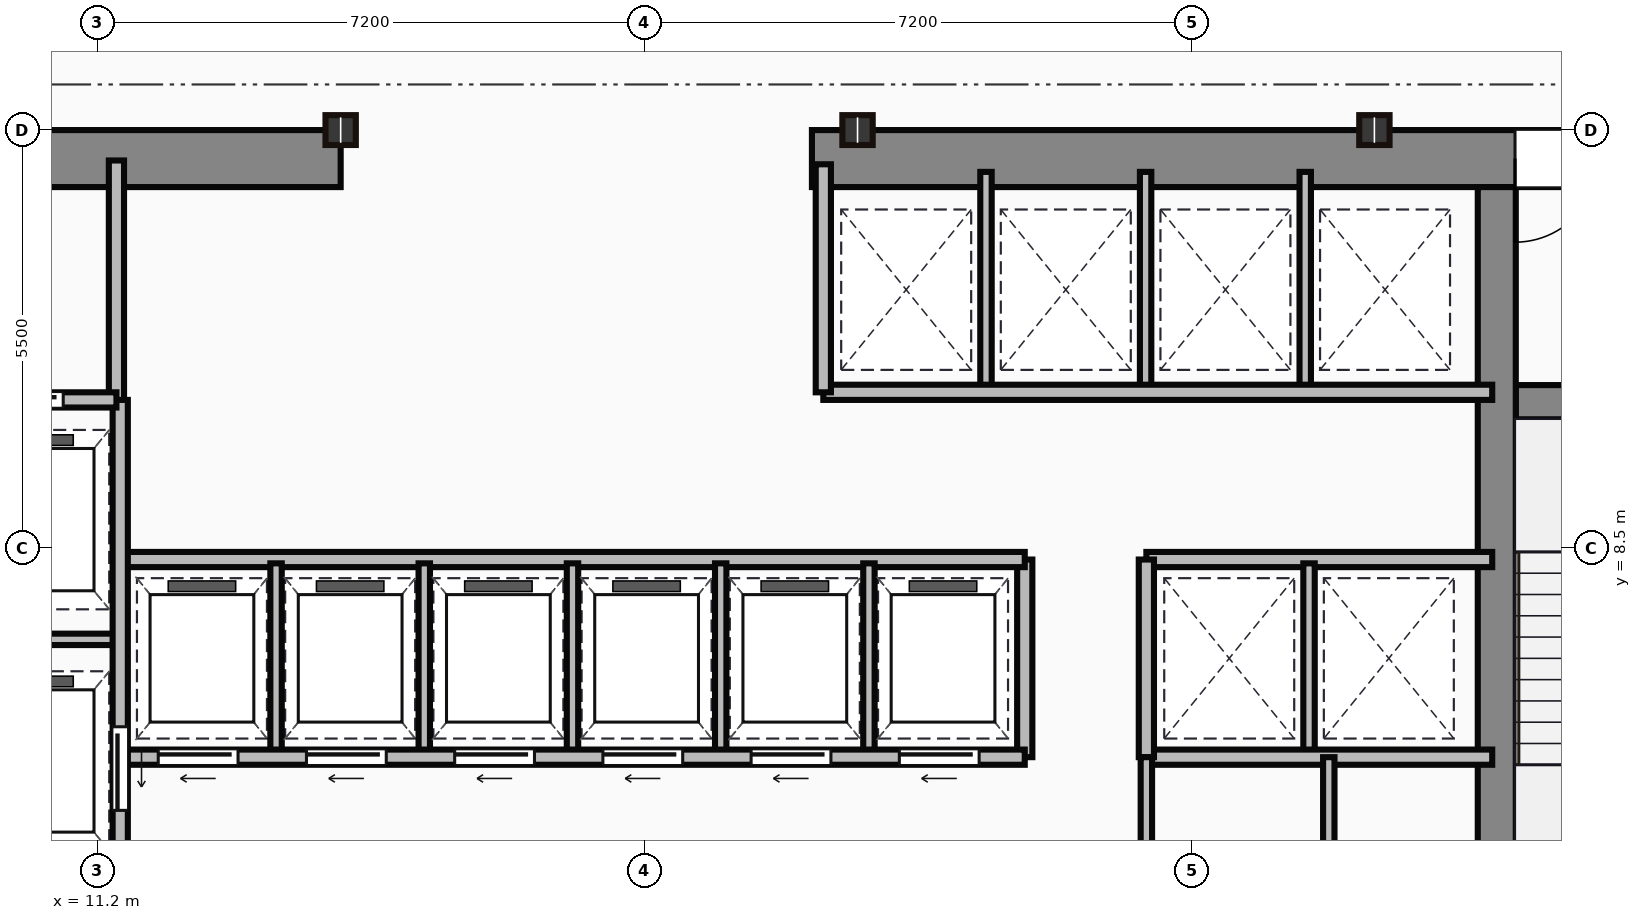
"""IFC4 building model, lengths in metres.
Left out: names, types, materials, properties, quantities, classifications, styles, units other than length and angle.
Written with IfcOpenShell. Run it as: python <this file> out.ifc"""

import sys

from ifc_helpers import new_model, si_unit, direction, frame, frame_2d, origin, origin_2d, place, context, subcontext, project, spatial, rectangle, i_section, extrude, source, transform, mapped, element, fill, save


model = new_model("IFC4")
c1 = context("Model", 3, precision=1e-05, world=origin(), true_north=direction((0.0, 1.0)))
c2 = subcontext(c1, "Body", "Model", "MODEL_VIEW")
j1 = project(units=[si_unit("LENGTHUNIT", "METRE"), si_unit("PLANEANGLEUNIT", "RADIAN")], contexts=[c1])
p1 = place(None, origin())
s1 = spatial("IfcSite", under=j1, at=p1, CompositionType="ELEMENT")
p2 = place(p1, origin())
s2 = spatial("IfcBuilding", under=s1, at=p2, CompositionType="ELEMENT")
p3 = place(p2, frame((0.0, 0.0, 128.8)))
s3 = spatial("IfcBuildingStorey", under=s2, at=p3, CompositionType="ELEMENT", Elevation=128.8)
m1 = source(origin(), c2, "Body", "SweptSolid", [
    extrude(rectangle(XDim=9.1, YDim=0.75, at=frame_2d((4.55, 0.0))), origin(), (0.0, 0.0, 1.0), 3.65),
])
p4 = place(p3, frame((5.3, 13.625, 0.0), z_axis=(0.0, 0.0, 1.0), x_axis=(1.0, 0.0, 0.0)))
e1 = element("IfcWall", 1, at=p4, inside=s3, PredefinedType="SHEAR", context=c2, shape_type="MappedRepresentation", body=[
    mapped(m1, transform((0.0, 0.0, 0.0))),
])
p5 = place(p4, frame((4.1, 0.0, 0.0)))
e2 = element("IfcOpeningElement", 2, at=p5, cuts=e1, PredefinedType="OPENING", context=c2, shape_type="SweptSolid", body=[
    extrude(rectangle(XDim=1.1, YDim=2.15, at=frame_2d((0.55, 1.075))), frame((0.0, 0.385, 0.0), z_axis=(0.0, -1.0, 0.0), x_axis=(1.0, 0.0, 0.0)), (0.0, 0.0, 1.0), 0.77),
])
m2 = source(origin(), c2, "Body", "SweptSolid", [
    extrude(rectangle(XDim=12.6, YDim=0.75, at=frame_2d((6.3, 0.0))), origin(), (0.0, 0.0, 1.0), 3.65),
])
p6 = place(p3, frame((20.6, 13.625, 0.0), z_axis=(0.0, 0.0, 1.0), x_axis=(1.0, 0.0, 0.0)))
e3 = element("IfcWall", 3, at=p6, inside=s3, PredefinedType="SHEAR", context=c2, shape_type="MappedRepresentation", body=[
    mapped(m2, transform((0.0, 0.0, 0.0))),
])
p7 = place(p6, frame((9.25, 0.0, 0.0)))
e4 = element("IfcOpeningElement", 4, at=p7, cuts=e3, PredefinedType="OPENING", context=c2, shape_type="SweptSolid", body=[
    extrude(rectangle(XDim=1.1, YDim=2.15, at=frame_2d((0.55, 1.075))), frame((0.0, 0.385, 0.0), z_axis=(0.0, -1.0, 0.0), x_axis=(1.0, 0.0, 0.0)), (0.0, 0.0, 1.0), 0.77),
])
m3 = source(origin(), c2, "Body", "SweptSolid", [
    extrude(rectangle(XDim=12.35, YDim=0.5, at=frame_2d((6.175, 0.0))), origin(), (0.0, 0.0, 1.0), 3.65),
])
p8 = place(p3, frame((29.61, 0.9, 0.0), z_axis=(0.0, 0.0, 1.0), x_axis=(0.0, 1.0, 0.0)))
e5 = element("IfcWall", 5, at=p8, inside=s3, PredefinedType="SHEAR", context=c2, shape_type="MappedRepresentation", body=[
    mapped(m3, transform((0.0, 0.0, 0.0))),
])
m4 = source(origin(), c2, "Body", "SweptSolid", [
    extrude(rectangle(XDim=3.39, YDim=0.45, at=frame_2d((1.695, 0.0))), origin(), (0.0, 0.0, 1.0), 3.65),
])
p9 = place(p3, frame((29.86, 10.42, 0.0), z_axis=(0.0, 0.0, 1.0), x_axis=(1.0, 0.0, 0.0)))
e6 = element("IfcWall", 6, at=p9, inside=s3, PredefinedType="SHEAR", context=c2, shape_type="MappedRepresentation", body=[
    mapped(m4, transform((0.0, 0.0, 0.0))),
])
p10 = place(p9, frame((1.1, 0.0, 0.0)))
e7 = element("IfcOpeningElement", 7, at=p10, cuts=e6, PredefinedType="OPENING", context=c2, shape_type="SweptSolid", body=[
    extrude(rectangle(XDim=1.1, YDim=2.15, at=frame_2d((0.55, 1.075))), frame((0.0, 0.235, 0.0), z_axis=(0.0, -1.0, 0.0), x_axis=(1.0, 0.0, 0.0)), (0.0, 0.0, 1.0), 0.47),
])
m5 = source(origin(), c2, "Body", "SweptSolid", [
    extrude(i_section(OverallWidth=0.399, OverallDepth=0.393, WebThickness=0.023, FlangeThickness=0.037, at=origin_2d()), origin(), (0.0, 0.0, 1.0), 3.65),
])
for number, where, z_axis, x_axis in (
    (8, (14.4, 14.0, 0.0), (0.0, 0.0, 1.0), (1.0, 0.0, 0.0)),
    (9, (21.2, 14.0, 0.0), (0.0, 0.0, 1.0), (1.0, 0.0, 0.0)),
    (10, (28.0, 14.0, 0.0), (0.0, 0.0, 1.0), (1.0, 0.0, 0.0)),
):
    element("IfcColumn", number, at=place(p3, frame(where, z_axis=z_axis, x_axis=x_axis)), inside=s3, PredefinedType="COLUMN", context=c2, shape_type="MappedRepresentation", body=[
        mapped(m5, transform((0.0, 0.0, 0.0))),
    ])
m6 = source(origin(), c2, "Body", "SweptSolid", [
    extrude(rectangle(XDim=3.18, YDim=0.2, at=frame_2d((1.59, 0.0))), origin(), (0.0, 0.0, 1.0), 3.4),
])
p11 = place(p3, frame((11.45, 10.42, 0.0), z_axis=(0.0, 0.0, 1.0), x_axis=(0.0, 1.0, 0.0)))
e11 = element("IfcWall", 11, at=p11, inside=s3, PredefinedType="PARTITIONING", context=c2, shape_type="MappedRepresentation", body=[
    mapped(m6, transform((0.0, 0.0, 0.0))),
])
m7 = source(origin(), c2, "Body", "SweptSolid", [
    extrude(rectangle(XDim=2.35, YDim=0.2, at=frame_2d((1.175, 0.0))), origin(), (0.0, 0.0, 1.0), 3.4),
])
p12 = place(p3, frame((9.1, 10.45, 0.0), z_axis=(0.0, 0.0, 1.0), x_axis=(1.0, 0.0, 0.0)))
e12 = element("IfcWall", 12, at=p12, inside=s3, PredefinedType="PARTITIONING", context=c2, shape_type="MappedRepresentation", body=[
    mapped(m7, transform((0.0, 0.0, 0.0))),
])
p13 = place(p12, frame((0.55, 0.0, 0.0)))
e13 = element("IfcOpeningElement", 13, at=p13, cuts=e12, PredefinedType="OPENING", context=c2, shape_type="SweptSolid", body=[
    extrude(rectangle(XDim=1.1, YDim=2.15, at=frame_2d((0.55, 1.075))), frame((0.0, 0.11, 0.0), z_axis=(0.0, -1.0, 0.0), x_axis=(1.0, 0.0, 0.0)), (0.0, 0.0, 1.0), 0.22),
])
m8 = source(origin(), c2, "Body", "SweptSolid", [
    extrude(rectangle(XDim=9.6, YDim=0.2, at=frame_2d((4.8, 0.0))), origin(), (0.0, 0.0, 1.0), 3.4),
])
p14 = place(p3, frame((11.5, 0.85, 0.0), z_axis=(0.0, 0.0, 1.0), x_axis=(0.0, 1.0, 0.0)))
e14 = element("IfcWall", 14, at=p14, inside=s3, PredefinedType="PARTITIONING", context=c2, shape_type="MappedRepresentation", body=[
    mapped(m8, transform((0.0, 0.0, 0.0))),
])
p15 = place(p14, frame((4.2, 0.0, 0.0)))
e15 = element("IfcOpeningElement", 15, at=p15, cuts=e14, PredefinedType="OPENING", context=c2, shape_type="SweptSolid", body=[
    extrude(rectangle(XDim=1.1, YDim=2.15, at=frame_2d((0.55, 1.075))), frame((0.0, 0.11, 0.0), z_axis=(0.0, -1.0, 0.0), x_axis=(1.0, 0.0, 0.0)), (0.0, 0.0, 1.0), 0.22),
])
p16 = place(p14, frame((0.9, 0.0, 0.0)))
e16 = element("IfcOpeningElement", 16, at=p16, cuts=e14, PredefinedType="OPENING", context=c2, shape_type="SweptSolid", body=[
    extrude(rectangle(XDim=1.2, YDim=2.15, at=frame_2d((0.6, 1.075))), frame((0.0, 0.11, 0.0), z_axis=(0.0, -1.0, 0.0), x_axis=(1.0, 0.0, 0.0)), (0.0, 0.0, 1.0), 0.22),
])
m9 = source(origin(), c2, "Body", "SweptSolid", [
    extrude(rectangle(XDim=2.4, YDim=0.15, at=frame_2d((1.2, 0.0))), origin(), (0.0, 0.0, 1.0), 3.4),
])
p17 = place(p3, frame((9.1, 7.3, 0.0), z_axis=(0.0, 0.0, 1.0), x_axis=(1.0, 0.0, 0.0)))
e17 = element("IfcWall", 17, at=p17, inside=s3, PredefinedType="PARTITIONING", context=c2, shape_type="MappedRepresentation", body=[
    mapped(m9, transform((0.0, 0.0, 0.0))),
])
m10 = source(origin(), c2, "Body", "SweptSolid", [
    extrude(rectangle(XDim=11.85, YDim=0.2, at=frame_2d((5.925, 0.0))), origin(), (0.0, 0.0, 1.0), 3.4),
])
p18 = place(p3, frame((11.55, 5.75, 0.0), z_axis=(0.0, 0.0, 1.0), x_axis=(1.0, 0.0, 0.0)))
e18 = element("IfcWall", 18, at=p18, inside=s3, PredefinedType="PARTITIONING", context=c2, shape_type="MappedRepresentation", body=[
    mapped(m10, transform((0.0, 0.0, 0.0))),
])
p19 = place(p18, frame((0.45, 0.0, 0.0)))
e19 = element("IfcOpeningElement", 19, at=p19, cuts=e18, PredefinedType="OPENING", context=c2, shape_type="SweptSolid", body=[
    extrude(rectangle(XDim=1.05, YDim=2.15, at=frame_2d((0.525, 1.075))), frame((0.0, 0.11, 0.0), z_axis=(0.0, -1.0, 0.0), x_axis=(1.0, 0.0, 0.0)), (0.0, 0.0, 1.0), 0.22),
])
p20 = place(p18, frame((2.4, 0.0, 0.0)))
e20 = element("IfcOpeningElement", 20, at=p20, cuts=e18, PredefinedType="OPENING", context=c2, shape_type="SweptSolid", body=[
    extrude(rectangle(XDim=1.05, YDim=2.15, at=frame_2d((0.525, 1.075))), frame((0.0, 0.11, 0.0), z_axis=(0.0, -1.0, 0.0), x_axis=(1.0, 0.0, 0.0)), (0.0, 0.0, 1.0), 0.22),
])
p21 = place(p18, frame((4.35, 0.0, 0.0)))
e21 = element("IfcOpeningElement", 21, at=p21, cuts=e18, PredefinedType="OPENING", context=c2, shape_type="SweptSolid", body=[
    extrude(rectangle(XDim=1.05, YDim=2.15, at=frame_2d((0.525, 1.075))), frame((0.0, 0.11, 0.0), z_axis=(0.0, -1.0, 0.0), x_axis=(1.0, 0.0, 0.0)), (0.0, 0.0, 1.0), 0.22),
])
p22 = place(p18, frame((6.3, 0.0, 0.0)))
e22 = element("IfcOpeningElement", 22, at=p22, cuts=e18, PredefinedType="OPENING", context=c2, shape_type="SweptSolid", body=[
    extrude(rectangle(XDim=1.05, YDim=2.15, at=frame_2d((0.525, 1.075))), frame((0.0, 0.11, 0.0), z_axis=(0.0, -1.0, 0.0), x_axis=(1.0, 0.0, 0.0)), (0.0, 0.0, 1.0), 0.22),
])
p23 = place(p18, frame((8.25, 0.0, 0.0)))
e23 = element("IfcOpeningElement", 23, at=p23, cuts=e18, PredefinedType="OPENING", context=c2, shape_type="SweptSolid", body=[
    extrude(rectangle(XDim=1.05, YDim=2.15, at=frame_2d((0.525, 1.075))), frame((0.0, 0.11, 0.0), z_axis=(0.0, -1.0, 0.0), x_axis=(1.0, 0.0, 0.0)), (0.0, 0.0, 1.0), 0.22),
])
p24 = place(p18, frame((10.2, 0.0, 0.0)))
e24 = element("IfcOpeningElement", 24, at=p24, cuts=e18, PredefinedType="OPENING", context=c2, shape_type="SweptSolid", body=[
    extrude(rectangle(XDim=1.05, YDim=2.15, at=frame_2d((0.525, 1.075))), frame((0.0, 0.11, 0.0), z_axis=(0.0, -1.0, 0.0), x_axis=(1.0, 0.0, 0.0)), (0.0, 0.0, 1.0), 0.22),
])
p25 = place(p3, frame((11.55, 8.35, 0.0), z_axis=(0.0, 0.0, 1.0), x_axis=(1.0, 0.0, 0.0)))
e25 = element("IfcWall", 25, at=p25, inside=s3, PredefinedType="PARTITIONING", context=c2, shape_type="MappedRepresentation", body=[
    mapped(m10, transform((0.0, 0.0, 0.0))),
])
m11 = source(origin(), c2, "Body", "SweptSolid", [
    extrude(rectangle(XDim=2.6, YDim=0.2, at=frame_2d((1.3, 0.0))), origin(), (0.0, 0.0, 1.0), 3.4),
])
p26 = place(p3, frame((23.4, 5.75, 0.0), z_axis=(0.0, 0.0, 1.0), x_axis=(0.0, 1.0, 0.0)))
e26 = element("IfcWall", 26, at=p26, inside=s3, PredefinedType="PARTITIONING", context=c2, shape_type="MappedRepresentation", body=[
    mapped(m11, transform((0.0, 0.0, 0.0))),
])
m12 = source(origin(), c2, "Body", "SweptSolid", [
    extrude(rectangle(XDim=2.5, YDim=0.15, at=frame_2d((1.25, 0.0))), origin(), (0.0, 0.0, 1.0), 3.4),
])
for number, where, z_axis, x_axis in (
    (27, (13.55, 5.8, 0.0), (0.0, 0.0, 1.0), (0.0, 1.0, 0.0)),
    (28, (15.5, 5.8, 0.0), (0.0, 0.0, 1.0), (0.0, 1.0, 0.0)),
    (29, (17.45, 5.8, 0.0), (0.0, 0.0, 1.0), (0.0, 1.0, 0.0)),
    (30, (19.4, 5.8, 0.0), (0.0, 0.0, 1.0), (0.0, 1.0, 0.0)),
    (31, (21.35, 5.8, 0.0), (0.0, 0.0, 1.0), (0.0, 1.0, 0.0)),
):
    element("IfcWall", number, at=place(p3, frame(where, z_axis=z_axis, x_axis=x_axis)), inside=s3, PredefinedType="PARTITIONING", context=c2, shape_type="MappedRepresentation", body=[
        mapped(m12, transform((0.0, 0.0, 0.0))),
    ])
m13 = source(origin(), c2, "Body", "SweptSolid", [
    extrude(rectangle(XDim=8.8, YDim=0.2, at=frame_2d((4.4, 0.0))), origin(), (0.0, 0.0, 1.0), 3.4),
])
p27 = place(p3, frame((20.75, 10.55, 0.0), z_axis=(0.0, 0.0, 1.0), x_axis=(1.0, 0.0, 0.0)))
e32 = element("IfcWall", 32, at=p27, inside=s3, PredefinedType="PARTITIONING", context=c2, shape_type="MappedRepresentation", body=[
    mapped(m13, transform((0.0, 0.0, 0.0))),
])
m14 = source(origin(), c2, "Body", "SweptSolid", [
    extrude(rectangle(XDim=3.0, YDim=0.2, at=frame_2d((1.5, 0.0))), origin(), (0.0, 0.0, 1.0), 3.4),
])
p28 = place(p3, frame((20.75, 10.55, 0.0), z_axis=(0.0, 0.0, 1.0), x_axis=(0.0, 1.0, 0.0)))
e33 = element("IfcWall", 33, at=p28, inside=s3, PredefinedType="PARTITIONING", context=c2, shape_type="MappedRepresentation", body=[
    mapped(m14, transform((0.0, 0.0, 0.0))),
])
m15 = source(origin(), c2, "Body", "SweptSolid", [
    extrude(rectangle(XDim=2.85, YDim=0.15, at=frame_2d((1.425, 0.0))), origin(), (0.0, 0.0, 1.0), 3.4),
])
for number, where, z_axis, x_axis in (
    (34, (22.89, 10.6, 0.0), (0.0, 0.0, 1.0), (0.0, 1.0, 0.0)),
    (35, (24.99, 10.6, 0.0), (0.0, 0.0, 1.0), (0.0, 1.0, 0.0)),
    (36, (27.09, 10.6, 0.0), (0.0, 0.0, 1.0), (0.0, 1.0, 0.0)),
):
    element("IfcWall", number, at=place(p3, frame(where, z_axis=z_axis, x_axis=x_axis)), inside=s3, PredefinedType="PARTITIONING", context=c2, shape_type="MappedRepresentation", body=[
        mapped(m15, transform((0.0, 0.0, 0.0))),
    ])
m16 = source(origin(), c2, "Body", "SweptSolid", [
    extrude(rectangle(XDim=4.55, YDim=0.2, at=frame_2d((2.275, 0.0))), origin(), (0.0, 0.0, 1.0), 3.4),
])
for number, where, z_axis, x_axis in (
    (37, (25.0, 8.35, 0.0), (0.0, 0.0, 1.0), (1.0, 0.0, 0.0)),
    (38, (25.0, 5.75, 0.0), (0.0, 0.0, 1.0), (1.0, 0.0, 0.0)),
):
    element("IfcWall", number, at=place(p3, frame(where, z_axis=z_axis, x_axis=x_axis)), inside=s3, PredefinedType="PARTITIONING", context=c2, shape_type="MappedRepresentation", body=[
        mapped(m16, transform((0.0, 0.0, 0.0))),
    ])
p29 = place(p3, frame((25.0, 5.75, 0.0), z_axis=(0.0, 0.0, 1.0), x_axis=(0.0, 1.0, 0.0)))
e39 = element("IfcWall", 39, at=p29, inside=s3, PredefinedType="PARTITIONING", context=c2, shape_type="MappedRepresentation", body=[
    mapped(m11, transform((0.0, 0.0, 0.0))),
])
p30 = place(p3, frame((27.14, 5.8, 0.0), z_axis=(0.0, 0.0, 1.0), x_axis=(0.0, 1.0, 0.0)))
e40 = element("IfcWall", 40, at=p30, inside=s3, PredefinedType="PARTITIONING", context=c2, shape_type="MappedRepresentation", body=[
    mapped(m12, transform((0.0, 0.0, 0.0))),
])
m17 = source(origin(), c2, "Body", "SweptSolid", [
    extrude(rectangle(XDim=4.9, YDim=0.15, at=frame_2d((2.45, 0.0))), origin(), (0.0, 0.0, 1.0), 3.4),
])
p31 = place(p3, frame((25.0, 0.85, 0.0), z_axis=(0.0, 0.0, 1.0), x_axis=(0.0, 1.0, 0.0)))
e41 = element("IfcWall", 41, at=p31, inside=s3, PredefinedType="PARTITIONING", context=c2, shape_type="MappedRepresentation", body=[
    mapped(m17, transform((0.0, 0.0, 0.0))),
])
p32 = place(p31, frame((2.5, 0.0, 0.0)))
e42 = element("IfcOpeningElement", 42, at=p32, cuts=e41, PredefinedType="OPENING", context=c2, shape_type="SweptSolid", body=[
    extrude(rectangle(XDim=0.95, YDim=2.15, at=frame_2d((0.475, 1.075))), frame((0.0, 0.085, 0.0), z_axis=(0.0, -1.0, 0.0), x_axis=(1.0, 0.0, 0.0)), (0.0, 0.0, 1.0), 0.17),
])
m18 = source(origin(), c2, "Body", "SweptSolid", [
    extrude(rectangle(XDim=3.4, YDim=0.15, at=frame_2d((1.7, 0.0))), origin(), (0.0, 0.0, 1.0), 3.4),
])
p33 = place(p3, frame((27.4, 2.35, 0.0), z_axis=(0.0, 0.0, 1.0), x_axis=(0.0, 1.0, 0.0)))
e43 = element("IfcWall", 43, at=p33, inside=s3, PredefinedType="PARTITIONING", context=c2, shape_type="MappedRepresentation", body=[
    mapped(m18, transform((0.0, 0.0, 0.0))),
])
p34 = place(p33, frame((1.1, 0.0, 0.0)))
e44 = element("IfcOpeningElement", 44, at=p34, cuts=e43, PredefinedType="OPENING", context=c2, shape_type="SweptSolid", body=[
    extrude(rectangle(XDim=0.85, YDim=2.1, at=frame_2d((0.425, 1.05))), frame((0.0, 0.085, 0.0), z_axis=(0.0, -1.0, 0.0), x_axis=(1.0, 0.0, 0.0)), (0.0, 0.0, 1.0), 0.17),
])
m19 = source(origin(), c2, "Body", "SweptSolid", [
    extrude(rectangle(XDim=1.1, YDim=2.15, at=frame_2d((0.55, 1.075))), frame((0.0, 0.025, 0.0), z_axis=(0.0, -1.0, 0.0), x_axis=(1.0, 0.0, 0.0)), (0.0, 0.0, 1.0), 0.05),
])
p35 = place(p7, origin())
e45 = element("IfcDoor", 45, at=p35, inside=s3, OperationType="SINGLE_SWING_LEFT", PredefinedType="DOOR", context=c2, shape_type="MappedRepresentation", body=[
    mapped(m19, transform((0.0, 0.0, 0.0))),
])
fill(e4, e45)
p36 = place(p13, origin())
e46 = element("IfcDoor", 46, at=p36, inside=s3, OperationType="SLIDING_TO_LEFT", PredefinedType="DOOR", context=c2, shape_type="MappedRepresentation", body=[
    mapped(m19, transform((0.0, 0.0, 0.0))),
])
fill(e13, e46)
p37 = place(p15, frame((1.1, 0.0, 0.0), z_axis=(0.0, 0.0, 1.0), x_axis=(-1.0, 0.0, 0.0)))
e47 = element("IfcDoor", 47, at=p37, inside=s3, OperationType="SLIDING_TO_LEFT", PredefinedType="DOOR", context=c2, shape_type="MappedRepresentation", body=[
    mapped(m19, transform((0.0, 0.0, 0.0))),
])
fill(e15, e47)
m20 = source(origin(), c2, "Body", "SweptSolid", [
    extrude(rectangle(XDim=1.05, YDim=2.15, at=frame_2d((0.525, 1.075))), frame((0.0, 0.025, 0.0), z_axis=(0.0, -1.0, 0.0), x_axis=(1.0, 0.0, 0.0)), (0.0, 0.0, 1.0), 0.05),
])
p38 = place(p19, frame((1.05, 0.0, 0.0), z_axis=(0.0, 0.0, 1.0), x_axis=(-1.0, 0.0, 0.0)))
e48 = element("IfcDoor", 48, at=p38, inside=s3, OperationType="SLIDING_TO_LEFT", PredefinedType="DOOR", context=c2, shape_type="MappedRepresentation", body=[
    mapped(m20, transform((0.0, 0.0, 0.0))),
])
fill(e19, e48)
p39 = place(p20, frame((1.05, 0.0, 0.0), z_axis=(0.0, 0.0, 1.0), x_axis=(-1.0, 0.0, 0.0)))
e49 = element("IfcDoor", 49, at=p39, inside=s3, OperationType="SLIDING_TO_LEFT", PredefinedType="DOOR", context=c2, shape_type="MappedRepresentation", body=[
    mapped(m20, transform((0.0, 0.0, 0.0))),
])
fill(e20, e49)
p40 = place(p21, frame((1.05, 0.0, 0.0), z_axis=(0.0, 0.0, 1.0), x_axis=(-1.0, 0.0, 0.0)))
e50 = element("IfcDoor", 50, at=p40, inside=s3, OperationType="SLIDING_TO_LEFT", PredefinedType="DOOR", context=c2, shape_type="MappedRepresentation", body=[
    mapped(m20, transform((0.0, 0.0, 0.0))),
])
fill(e21, e50)
p41 = place(p22, frame((1.05, 0.0, 0.0), z_axis=(0.0, 0.0, 1.0), x_axis=(-1.0, 0.0, 0.0)))
e51 = element("IfcDoor", 51, at=p41, inside=s3, OperationType="SLIDING_TO_LEFT", PredefinedType="DOOR", context=c2, shape_type="MappedRepresentation", body=[
    mapped(m20, transform((0.0, 0.0, 0.0))),
])
fill(e22, e51)
p42 = place(p23, frame((1.05, 0.0, 0.0), z_axis=(0.0, 0.0, 1.0), x_axis=(-1.0, 0.0, 0.0)))
e52 = element("IfcDoor", 52, at=p42, inside=s3, OperationType="SLIDING_TO_LEFT", PredefinedType="DOOR", context=c2, shape_type="MappedRepresentation", body=[
    mapped(m20, transform((0.0, 0.0, 0.0))),
])
fill(e23, e52)
p43 = place(p24, frame((1.05, 0.0, 0.0), z_axis=(0.0, 0.0, 1.0), x_axis=(-1.0, 0.0, 0.0)))
e53 = element("IfcDoor", 53, at=p43, inside=s3, OperationType="SLIDING_TO_LEFT", PredefinedType="DOOR", context=c2, shape_type="MappedRepresentation", body=[
    mapped(m20, transform((0.0, 0.0, 0.0))),
])
fill(e24, e53)
save(model, sys.argv[1])
